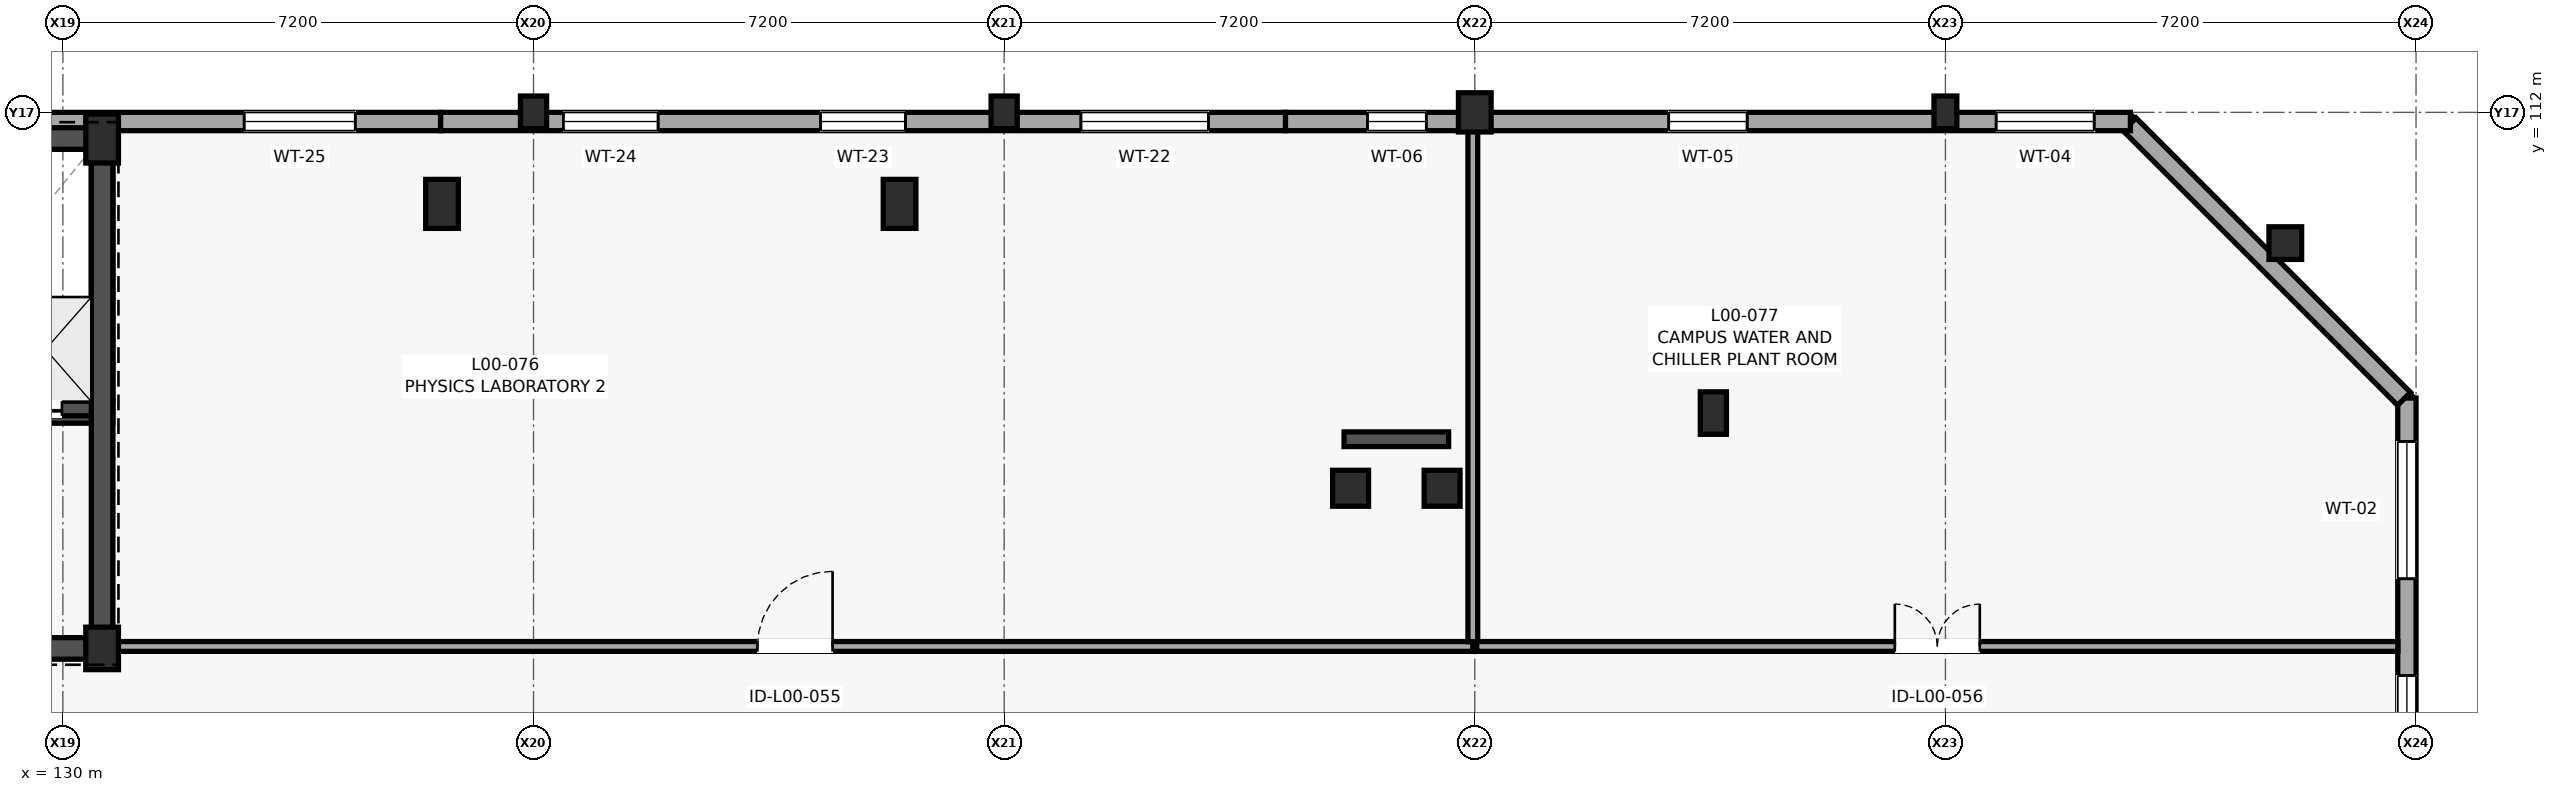
"""IFC4 building model, lengths in metres.
Left out: names, types, materials, properties, quantities, classifications, styles, units other than length and angle.
Written with IfcOpenShell. Run it as: python <this file> out.ifc"""

import sys

from ifc_helpers import new_model, si_unit, direction, frame, frame_2d, origin, origin_2d, place, context, subcontext, project, spatial, rectangle, extrude, element, fill, save


model = new_model("IFC4")
c1 = context("Model", 3, precision=1e-05, world=origin(), true_north=direction((0.0, 1.0)))
c2 = subcontext(c1, "Body", "Model", "MODEL_VIEW")
j1 = project(units=[si_unit("LENGTHUNIT", "METRE"), si_unit("PLANEANGLEUNIT", "RADIAN")], contexts=[c1])
p1 = place(None, origin())
s1 = spatial("IfcSite", under=j1, at=p1, CompositionType="ELEMENT")
p2 = place(p1, origin())
s2 = spatial("IfcBuilding", under=s1, at=p2, CompositionType="ELEMENT")
p3 = place(p2, origin())
s3 = spatial("IfcBuildingStorey", under=s2, at=p3, CompositionType="ELEMENT", Elevation=0.0)
for number, where, z_axis, x_axis in (
    (1, (126.955, 107.41, -1.55), (0.0, 0.0, 1.0), (1.0, 0.0, 0.0)),
    (2, (126.955, 111.6, -1.55), (0.0, 0.0, 1.0), (1.0, 0.0, 0.0)),
):
    element("IfcWall", number, at=place(p3, frame(where, z_axis=z_axis, x_axis=x_axis)), inside=s3, PredefinedType="SHEAR", context=c2, shape_type="SweptSolid", body=[
        extrude(rectangle(XDim=3.81, YDim=0.33, at=frame_2d((1.905, 0.0))), origin(), (0.0, 0.0, 1.0), 1.3),
    ])
p4 = place(p3, frame((130.6, 107.575, -1.55), z_axis=(0.0, 0.0, 1.0), x_axis=(0.0, 1.0, 0.0)))
e3 = element("IfcWall", 3, at=p4, inside=s3, PredefinedType="SHEAR", context=c2, shape_type="SweptSolid", body=[
    extrude(rectangle(XDim=3.86, YDim=0.33, at=frame_2d((1.93, 0.0))), origin(), (0.0, 0.0, 1.0), 1.3),
])
p5 = place(p3, frame((130.6, 103.8, 0.0), z_axis=(0.0, 0.0, 1.0), x_axis=(1.0, 0.0, 0.0)))
e4 = element("IfcColumn", 4, at=p5, inside=s3, PredefinedType="COLUMN", context=c2, shape_type="SweptSolid", body=[
    extrude(rectangle(XDim=0.5, YDim=0.65, at=origin_2d()), origin(), (0.0, 0.0, 1.0), 4.2),
])
for number, where, z_axis, x_axis in (
    (5, (130.6, 111.6, 0.0), (0.0, 0.0, 1.0), (1.0, 0.0, 0.0)),
    (6, (135.8, 110.6, 0.0), (0.0, 0.0, 1.0), (1.0, 0.0, 0.0)),
):
    element("IfcColumn", number, at=place(p3, frame(where, z_axis=z_axis, x_axis=x_axis)), inside=s3, PredefinedType="COLUMN", context=c2, shape_type="SweptSolid", body=[
        extrude(rectangle(XDim=0.5, YDim=0.75, at=origin_2d()), origin(), (0.0, 0.0, 1.0), 4.2),
    ])
p6 = place(p3, frame((137.2, 112.0, 0.0), z_axis=(0.0, 0.0, 1.0), x_axis=(1.0, 0.0, 0.0)))
e7 = element("IfcColumn", 7, at=p6, inside=s3, PredefinedType="PILASTER", context=c2, shape_type="SweptSolid", body=[
    extrude(rectangle(XDim=0.4, YDim=0.5, at=origin_2d()), origin(), (0.0, 0.0, 1.0), 4.2),
])
p7 = place(p3, frame((142.8, 110.6, 0.0), z_axis=(0.0, 0.0, 1.0), x_axis=(1.0, 0.0, 0.0)))
e8 = element("IfcColumn", 8, at=p7, inside=s3, PredefinedType="COLUMN", context=c2, shape_type="SweptSolid", body=[
    extrude(rectangle(XDim=0.5, YDim=0.75, at=origin_2d()), origin(), (0.0, 0.0, 1.0), 4.2),
])
p8 = place(p3, frame((144.4, 112.0, 0.0), z_axis=(0.0, 0.0, 1.0), x_axis=(1.0, 0.0, 0.0)))
e9 = element("IfcColumn", 9, at=p8, inside=s3, PredefinedType="PILASTER", context=c2, shape_type="SweptSolid", body=[
    extrude(rectangle(XDim=0.4, YDim=0.5, at=origin_2d()), origin(), (0.0, 0.0, 1.0), 4.2),
])
for number, where, z_axis, x_axis in (
    (10, (149.7, 106.25, 0.0), (0.0, 0.0, 1.0), (1.0, 0.0, 0.0)),
    (11, (151.1, 106.25, 0.0), (0.0, 0.0, 1.0), (1.0, 0.0, 0.0)),
):
    element("IfcColumn", number, at=place(p3, frame(where, z_axis=z_axis, x_axis=x_axis)), inside=s3, PredefinedType="COLUMN", context=c2, shape_type="SweptSolid", body=[
        extrude(rectangle(XDim=0.55, YDim=0.55, at=origin_2d()), origin(), (0.0, 0.0, 1.0), 4.2),
    ])
p9 = place(p3, frame((151.6, 112.0, 0.0), z_axis=(0.0, 0.0, 1.0), x_axis=(1.0, 0.0, 0.0)))
e12 = element("IfcColumn", 12, at=p9, inside=s3, PredefinedType="PILASTER", context=c2, shape_type="SweptSolid", body=[
    extrude(rectangle(XDim=0.5, YDim=0.6, at=origin_2d()), origin(), (0.0, 0.0, 1.0), 4.2),
])
p10 = place(p3, frame((155.25, 107.4, 0.0), z_axis=(0.0, 0.0, 1.0), x_axis=(1.0, 0.0, 0.0)))
e13 = element("IfcColumn", 13, at=p10, inside=s3, PredefinedType="COLUMN", context=c2, shape_type="SweptSolid", body=[
    extrude(rectangle(XDim=0.4, YDim=0.65, at=origin_2d()), origin(), (0.0, 0.0, 1.0), 4.2),
])
p11 = place(p3, frame((158.8, 112.0, 0.0), z_axis=(0.0, 0.0, 1.0), x_axis=(1.0, 0.0, 0.0)))
e14 = element("IfcColumn", 14, at=p11, inside=s3, PredefinedType="PILASTER", context=c2, shape_type="SweptSolid", body=[
    extrude(rectangle(XDim=0.35, YDim=0.5, at=origin_2d()), origin(), (0.0, 0.0, 1.0), 4.2),
])
p12 = place(p3, frame((164.0, 110.0, 0.0), z_axis=(0.0, 0.0, 1.0), x_axis=(1.0, 0.0, 0.0)))
e15 = element("IfcColumn", 15, at=p12, inside=s3, PredefinedType="COLUMN", context=c2, shape_type="SweptSolid", body=[
    extrude(rectangle(XDim=0.5, YDim=0.5, at=origin_2d()), origin(), (0.0, 0.0, 1.0), 4.2),
])
p13 = place(p3, frame((165.86, 100.77, 0.0), z_axis=(0.0, 0.0, 1.0), x_axis=(0.0, 1.0, 0.0)))
e16 = element("IfcWall", 16, at=p13, inside=s3, PredefinedType="SOLIDWALL", context=c2, shape_type="SweptSolid", body=[
    extrude(rectangle(XDim=6.86, YDim=0.28, at=frame_2d((3.43, 0.0))), origin(), (0.0, 0.0, 1.0), 3.98),
])
p14 = place(p13, frame((0.815, 0.0, 0.85)))
e17 = element("IfcOpeningElement", 17, at=p14, cuts=e16, PredefinedType="OPENING", context=c2, shape_type="SweptSolid", body=[
    extrude(rectangle(XDim=1.8, YDim=1.8, at=frame_2d((0.9, 0.9))), frame((0.0, 0.15, 0.0), z_axis=(0.0, -1.0, 0.0), x_axis=(1.0, 0.0, 0.0)), (0.0, 0.0, 1.0), 0.3),
])
p15 = place(p13, frame((4.095, 0.0, 0.85)))
e18 = element("IfcOpeningElement", 18, at=p15, cuts=e16, PredefinedType="OPENING", context=c2, shape_type="SweptSolid", body=[
    extrude(rectangle(XDim=2.1, YDim=1.8, at=frame_2d((1.05, 0.9))), frame((0.0, 0.15, 0.0), z_axis=(0.0, -1.0, 0.0), x_axis=(1.0, 0.0, 0.0)), (0.0, 0.0, 1.0), 0.3),
])
p16 = place(p3, frame((165.816, 107.618, 0.0), z_axis=(0.0, 0.0, 1.0), x_axis=(-0.707106781187, 0.707106781187, 0.0)))
e19 = element("IfcWall", 19, at=p16, inside=s3, PredefinedType="SOLIDWALL", context=c2, shape_type="SweptSolid", body=[
    extrude(rectangle(XDim=5.937, YDim=0.28, at=frame_2d((2.968, 0.0))), origin(), (0.0, 0.0, 1.0), 3.98),
])
p17 = place(p3, frame((161.63, 111.86, 0.0), z_axis=(0.0, 0.0, 1.0), x_axis=(-1.0, 0.0, 0.0)))
e20 = element("IfcWall", 20, at=p17, inside=s3, PredefinedType="SOLIDWALL", context=c2, shape_type="SweptSolid", body=[
    extrude(rectangle(XDim=12.927, YDim=0.28, at=frame_2d((6.463, 0.0))), origin(), (0.0, 0.0, 1.0), 3.065),
])
p18 = place(p17, frame((0.554, 0.0, 0.85)))
e21 = element("IfcOpeningElement", 21, at=p18, cuts=e20, PredefinedType="OPENING", context=c2, shape_type="SweptSolid", body=[
    extrude(rectangle(XDim=1.5, YDim=1.65, at=frame_2d((0.75, 0.825))), frame((0.0, 0.15, 0.0), z_axis=(0.0, -1.0, 0.0), x_axis=(1.0, 0.0, 0.0)), (0.0, 0.0, 1.0), 0.3),
])
p19 = place(p17, frame((5.863, 0.0, 0.85)))
e22 = element("IfcOpeningElement", 22, at=p19, cuts=e20, PredefinedType="OPENING", context=c2, shape_type="SweptSolid", body=[
    extrude(rectangle(XDim=1.2, YDim=1.65, at=frame_2d((0.6, 0.825))), frame((0.0, 0.15, 0.0), z_axis=(0.0, -1.0, 0.0), x_axis=(1.0, 0.0, 0.0)), (0.0, 0.0, 1.0), 0.3),
])
p20 = place(p17, frame((10.772, 0.0, 1.05)))
e23 = element("IfcOpeningElement", 23, at=p20, cuts=e20, PredefinedType="OPENING", context=c2, shape_type="SweptSolid", body=[
    extrude(rectangle(XDim=0.9, YDim=1.5, at=frame_2d((0.45, 0.75))), frame((0.0, 0.15, 0.0), z_axis=(0.0, -1.0, 0.0), x_axis=(1.0, 0.0, 0.0)), (0.0, 0.0, 1.0), 0.3),
])
p21 = place(p3, frame((148.703, 111.86, 0.0), z_axis=(0.0, 0.0, 1.0), x_axis=(-1.0, 0.0, 0.0)))
e24 = element("IfcWall", 24, at=p21, inside=s3, PredefinedType="SOLIDWALL", context=c2, shape_type="SweptSolid", body=[
    extrude(rectangle(XDim=12.926, YDim=0.28, at=frame_2d((6.463, 0.0))), origin(), (0.0, 0.0, 1.0), 3.065),
])
p22 = place(p21, frame((1.179, 0.0, 1.05)))
e25 = element("IfcOpeningElement", 25, at=p22, cuts=e24, PredefinedType="OPENING", context=c2, shape_type="SweptSolid", body=[
    extrude(rectangle(XDim=1.95, YDim=1.5, at=frame_2d((0.975, 0.75))), frame((0.0, 0.15, 0.0), z_axis=(0.0, -1.0, 0.0), x_axis=(1.0, 0.0, 0.0)), (0.0, 0.0, 1.0), 0.3),
])
p23 = place(p21, frame((5.813, 0.0, 1.05)))
e26 = element("IfcOpeningElement", 26, at=p23, cuts=e24, PredefinedType="OPENING", context=c2, shape_type="SweptSolid", body=[
    extrude(rectangle(XDim=1.3, YDim=1.6, at=frame_2d((0.65, 0.8))), frame((0.0, 0.15, 0.0), z_axis=(0.0, -1.0, 0.0), x_axis=(1.0, 0.0, 0.0)), (0.0, 0.0, 1.0), 0.3),
])
p24 = place(p21, frame((9.597, 0.0, 0.85)))
e27 = element("IfcOpeningElement", 27, at=p24, cuts=e24, PredefinedType="OPENING", context=c2, shape_type="SweptSolid", body=[
    extrude(rectangle(XDim=1.45, YDim=1.7, at=frame_2d((0.725, 0.85))), frame((0.0, 0.15, 0.0), z_axis=(0.0, -1.0, 0.0), x_axis=(1.0, 0.0, 0.0)), (0.0, 0.0, 1.0), 0.3),
])
p25 = place(p3, frame((135.777, 111.86, 0.0), z_axis=(0.0, 0.0, 1.0), x_axis=(-1.0, 0.0, 0.0)))
e28 = element("IfcWall", 28, at=p25, inside=s3, PredefinedType="SOLIDWALL", context=c2, shape_type="SweptSolid", body=[
    extrude(rectangle(XDim=12.927, YDim=0.28, at=frame_2d((6.463, 0.0))), origin(), (0.0, 0.0, 1.0), 3.98),
])
p26 = place(p25, frame((1.304, 0.0, 0.85)))
e29 = element("IfcOpeningElement", 29, at=p26, cuts=e28, PredefinedType="OPENING", context=c2, shape_type="SweptSolid", body=[
    extrude(rectangle(XDim=1.7, YDim=1.75, at=frame_2d((0.85, 0.875))), frame((0.0, 0.15, 0.0), z_axis=(0.0, -1.0, 0.0), x_axis=(1.0, 0.0, 0.0)), (0.0, 0.0, 1.0), 0.3),
])
p27 = place(p3, frame((123.235, 103.8, 0.0), z_axis=(0.0, 0.0, 1.0), x_axis=(1.0, 0.0, 0.0)))
e30 = element("IfcWall", 30, at=p27, inside=s3, PredefinedType="SHEAR", context=c2, shape_type="SweptSolid", body=[
    extrude(rectangle(XDim=7.53, YDim=0.33, at=frame_2d((3.765, 0.0))), origin(), (0.0, 0.0, 1.0), 3.98),
])
p28 = place(p27, frame((5.015, 0.0, 0.0)))
e31 = element("IfcOpeningElement", 31, at=p28, cuts=e30, PredefinedType="OPENING", context=c2, shape_type="SweptSolid", body=[
    extrude(rectangle(XDim=1.05, YDim=2.15, at=frame_2d((0.525, 1.075))), frame((0.0, 0.175, 0.0), z_axis=(0.0, -1.0, 0.0), x_axis=(1.0, 0.0, 0.0)), (0.0, 0.0, 1.0), 0.35),
])
p29 = place(p27, frame((1.565, 0.0, 0.0)))
e32 = element("IfcOpeningElement", 32, at=p29, cuts=e30, PredefinedType="OPENING", context=c2, shape_type="SweptSolid", body=[
    extrude(rectangle(XDim=1.2, YDim=2.2, at=frame_2d((0.6, 1.1))), frame((0.0, 0.175, 0.0), z_axis=(0.0, -1.0, 0.0), x_axis=(1.0, 0.0, 0.0)), (0.0, 0.0, 1.0), 0.35),
])
p30 = place(p3, frame((123.235, 111.6, 0.0), z_axis=(0.0, 0.0, 1.0), x_axis=(1.0, 0.0, 0.0)))
e33 = element("IfcWall", 33, at=p30, inside=s3, PredefinedType="SHEAR", context=c2, shape_type="SweptSolid", body=[
    extrude(rectangle(XDim=7.53, YDim=0.33, at=frame_2d((3.765, 0.0))), origin(), (0.0, 0.0, 1.0), 3.98),
])
p31 = place(p3, frame((130.6, 103.965, 0.0), z_axis=(0.0, 0.0, 1.0), x_axis=(0.0, 1.0, 0.0)))
e34 = element("IfcWall", 34, at=p31, inside=s3, PredefinedType="SHEAR", context=c2, shape_type="SweptSolid", body=[
    extrude(rectangle(XDim=7.47, YDim=0.33, at=frame_2d((3.735, 0.0))), origin(), (0.0, 0.0, 1.0), 3.98),
])
p32 = place(p3, frame((127.285, 107.47, 0.0), z_axis=(0.0, 0.0, 1.0), x_axis=(1.0, 0.0, 0.0)))
e35 = element("IfcWall", 35, at=p32, inside=s3, PredefinedType="SHEAR", context=c2, shape_type="SweptSolid", body=[
    extrude(rectangle(XDim=3.15, YDim=0.225, at=frame_2d((1.575, 0.0))), origin(), (0.0, 0.0, 1.0), 3.98),
])
p33 = place(p32, frame((0.2, 0.0, 0.0)))
e36 = element("IfcOpeningElement", 36, at=p33, cuts=e35, PredefinedType="OPENING", context=c2, shape_type="SweptSolid", body=[
    extrude(rectangle(XDim=0.95, YDim=2.15, at=frame_2d((0.475, 1.075))), frame((0.0, 0.123, 0.0), z_axis=(0.0, -1.0, 0.0), x_axis=(1.0, 0.0, 0.0)), (0.0, 0.0, 1.0), 0.245),
])
p34 = place(p32, frame((1.65, 0.0, 0.0)))
e37 = element("IfcOpeningElement", 37, at=p34, cuts=e35, PredefinedType="OPENING", context=c2, shape_type="SweptSolid", body=[
    extrude(rectangle(XDim=1.05, YDim=2.2, at=frame_2d((0.525, 1.1))), frame((0.0, 0.123, 0.0), z_axis=(0.0, -1.0, 0.0), x_axis=(1.0, 0.0, 0.0)), (0.0, 0.0, 1.0), 0.245),
])
p35 = place(p3, frame((149.6, 107.0, 0.0), z_axis=(0.0, 0.0, 1.0), x_axis=(1.0, 0.0, 0.0)))
e38 = element("IfcWall", 38, at=p35, inside=s3, PredefinedType="SHEAR", context=c2, shape_type="SweptSolid", body=[
    extrude(rectangle(XDim=1.6, YDim=0.225, at=frame_2d((0.8, 0.0))), origin(), (0.0, 0.0, 1.0), 3.92),
])
p36 = place(p3, frame((130.83, 103.83, 0.0), z_axis=(0.0, 0.0, 1.0), x_axis=(1.0, 0.0, 0.0)))
e39 = element("IfcWall", 39, at=p36, inside=s3, PredefinedType="PARTITIONING", context=c2, shape_type="SweptSolid", body=[
    extrude(rectangle(XDim=20.74, YDim=0.15, at=frame_2d((10.37, 0.0))), origin(), (0.0, 0.0, 1.0), 3.915),
])
p37 = place(p36, frame((9.795, 0.0, 0.0)))
e40 = element("IfcOpeningElement", 40, at=p37, cuts=e39, PredefinedType="OPENING", context=c2, shape_type="SweptSolid", body=[
    extrude(rectangle(XDim=1.15, YDim=2.2, at=frame_2d((0.575, 1.1))), frame((0.0, 0.085, 0.0), z_axis=(0.0, -1.0, 0.0), x_axis=(1.0, 0.0, 0.0)), (0.0, 0.0, 1.0), 0.17),
])
p38 = place(p3, frame((151.57, 103.903, 0.0), z_axis=(0.0, 0.0, 1.0), x_axis=(0.0, 1.0, 0.0)))
e41 = element("IfcWall", 41, at=p38, inside=s3, PredefinedType="PARTITIONING", context=c2, shape_type="SweptSolid", body=[
    extrude(rectangle(XDim=7.819, YDim=0.15, at=frame_2d((3.909, 0.0))), origin(), (0.0, 0.0, 1.0), 3.315),
])
p39 = place(p3, frame((151.63, 103.83, 0.0), z_axis=(0.0, 0.0, 1.0), x_axis=(1.0, 0.0, 0.0)))
e42 = element("IfcWall", 42, at=p39, inside=s3, PredefinedType="PARTITIONING", context=c2, shape_type="SweptSolid", body=[
    extrude(rectangle(XDim=14.092, YDim=0.15, at=frame_2d((7.046, 0.0))), origin(), (0.0, 0.0, 1.0), 3.915),
])
p40 = place(p39, frame((6.396, 0.0, 0.0)))
e43 = element("IfcOpeningElement", 43, at=p40, cuts=e42, PredefinedType="OPENING", context=c2, shape_type="SweptSolid", body=[
    extrude(rectangle(XDim=1.3, YDim=2.15, at=frame_2d((0.65, 1.075))), frame((0.0, 0.085, 0.0), z_axis=(0.0, -1.0, 0.0), x_axis=(1.0, 0.0, 0.0)), (0.0, 0.0, 1.0), 0.17),
])
p41 = place(p14, origin())
e44 = element("IfcWindow", 44, at=p41, inside=s3, PartitioningType="SINGLE_PANEL", PredefinedType="WINDOW", context=c2, shape_type="SweptSolid", body=[
    extrude(rectangle(XDim=1.8, YDim=1.8, at=frame_2d((0.9, 0.9))), frame((0.0, 0.03, 0.0), z_axis=(0.0, -1.0, 0.0), x_axis=(1.0, 0.0, 0.0)), (0.0, 0.0, 1.0), 0.06),
])
fill(e17, e44)
p42 = place(p15, origin())
e45 = element("IfcWindow", 45, at=p42, inside=s3, PartitioningType="SINGLE_PANEL", PredefinedType="WINDOW", context=c2, shape_type="SweptSolid", body=[
    extrude(rectangle(XDim=2.1, YDim=1.8, at=frame_2d((1.05, 0.9))), frame((0.0, 0.03, 0.0), z_axis=(0.0, -1.0, 0.0), x_axis=(1.0, 0.0, 0.0)), (0.0, 0.0, 1.0), 0.06),
])
fill(e18, e45)
p43 = place(p18, origin())
e46 = element("IfcWindow", 46, at=p43, inside=s3, PartitioningType="SINGLE_PANEL", PredefinedType="WINDOW", context=c2, shape_type="SweptSolid", body=[
    extrude(rectangle(XDim=1.5, YDim=1.65, at=frame_2d((0.75, 0.825))), frame((0.0, 0.03, 0.0), z_axis=(0.0, -1.0, 0.0), x_axis=(1.0, 0.0, 0.0)), (0.0, 0.0, 1.0), 0.06),
])
fill(e21, e46)
p44 = place(p19, origin())
e47 = element("IfcWindow", 47, at=p44, inside=s3, PartitioningType="SINGLE_PANEL", PredefinedType="WINDOW", context=c2, shape_type="SweptSolid", body=[
    extrude(rectangle(XDim=1.2, YDim=1.65, at=frame_2d((0.6, 0.825))), frame((0.0, 0.03, 0.0), z_axis=(0.0, -1.0, 0.0), x_axis=(1.0, 0.0, 0.0)), (0.0, 0.0, 1.0), 0.06),
])
fill(e22, e47)
p45 = place(p20, origin())
e48 = element("IfcWindow", 48, at=p45, inside=s3, PartitioningType="SINGLE_PANEL", PredefinedType="WINDOW", context=c2, shape_type="SweptSolid", body=[
    extrude(rectangle(XDim=0.9, YDim=1.5, at=frame_2d((0.45, 0.75))), frame((0.0, 0.03, 0.0), z_axis=(0.0, -1.0, 0.0), x_axis=(1.0, 0.0, 0.0)), (0.0, 0.0, 1.0), 0.06),
])
fill(e23, e48)
p46 = place(p22, origin())
e49 = element("IfcWindow", 49, at=p46, inside=s3, PartitioningType="SINGLE_PANEL", PredefinedType="WINDOW", context=c2, shape_type="SweptSolid", body=[
    extrude(rectangle(XDim=1.95, YDim=1.5, at=frame_2d((0.975, 0.75))), frame((0.0, 0.03, 0.0), z_axis=(0.0, -1.0, 0.0), x_axis=(1.0, 0.0, 0.0)), (0.0, 0.0, 1.0), 0.06),
])
fill(e25, e49)
p47 = place(p23, origin())
e50 = element("IfcWindow", 50, at=p47, inside=s3, PartitioningType="SINGLE_PANEL", PredefinedType="WINDOW", context=c2, shape_type="SweptSolid", body=[
    extrude(rectangle(XDim=1.3, YDim=1.6, at=frame_2d((0.65, 0.8))), frame((0.0, 0.03, 0.0), z_axis=(0.0, -1.0, 0.0), x_axis=(1.0, 0.0, 0.0)), (0.0, 0.0, 1.0), 0.06),
])
fill(e26, e50)
p48 = place(p24, origin())
e51 = element("IfcWindow", 51, at=p48, inside=s3, PartitioningType="SINGLE_PANEL", PredefinedType="WINDOW", context=c2, shape_type="SweptSolid", body=[
    extrude(rectangle(XDim=1.45, YDim=1.7, at=frame_2d((0.725, 0.85))), frame((0.0, 0.03, 0.0), z_axis=(0.0, -1.0, 0.0), x_axis=(1.0, 0.0, 0.0)), (0.0, 0.0, 1.0), 0.06),
])
fill(e27, e51)
p49 = place(p26, origin())
e52 = element("IfcWindow", 52, at=p49, inside=s3, PartitioningType="SINGLE_PANEL", PredefinedType="WINDOW", context=c2, shape_type="SweptSolid", body=[
    extrude(rectangle(XDim=1.7, YDim=1.75, at=frame_2d((0.85, 0.875))), frame((0.0, 0.03, 0.0), z_axis=(0.0, -1.0, 0.0), x_axis=(1.0, 0.0, 0.0)), (0.0, 0.0, 1.0), 0.06),
])
fill(e29, e52)
p50 = place(p34, origin())
e53 = element("IfcDoor", 53, at=p50, inside=s3, OperationType="SLIDING_TO_RIGHT", PredefinedType="DOOR", context=c2, shape_type="SweptSolid", body=[
    extrude(rectangle(XDim=1.05, YDim=2.2, at=frame_2d((0.525, 1.1))), frame((0.0, 0.025, 0.0), z_axis=(0.0, -1.0, 0.0), x_axis=(1.0, 0.0, 0.0)), (0.0, 0.0, 1.0), 0.05),
])
fill(e37, e53)
p51 = place(p37, origin())
e54 = element("IfcDoor", 54, at=p51, inside=s3, OperationType="SINGLE_SWING_RIGHT", PredefinedType="DOOR", context=c2, shape_type="SweptSolid", body=[
    extrude(rectangle(XDim=1.15, YDim=2.2, at=frame_2d((0.575, 1.1))), frame((0.0, 0.025, 0.0), z_axis=(0.0, -1.0, 0.0), x_axis=(1.0, 0.0, 0.0)), (0.0, 0.0, 1.0), 0.05),
])
fill(e40, e54)
p52 = place(p40, origin())
e55 = element("IfcDoor", 55, at=p52, inside=s3, OperationType="DOUBLE_DOOR_SINGLE_SWING", PredefinedType="DOOR", context=c2, shape_type="SweptSolid", body=[
    extrude(rectangle(XDim=1.3, YDim=2.15, at=frame_2d((0.65, 1.075))), frame((0.0, 0.025, 0.0), z_axis=(0.0, -1.0, 0.0), x_axis=(1.0, 0.0, 0.0)), (0.0, 0.0, 1.0), 0.05),
])
fill(e43, e55)
save(model, sys.argv[1])
